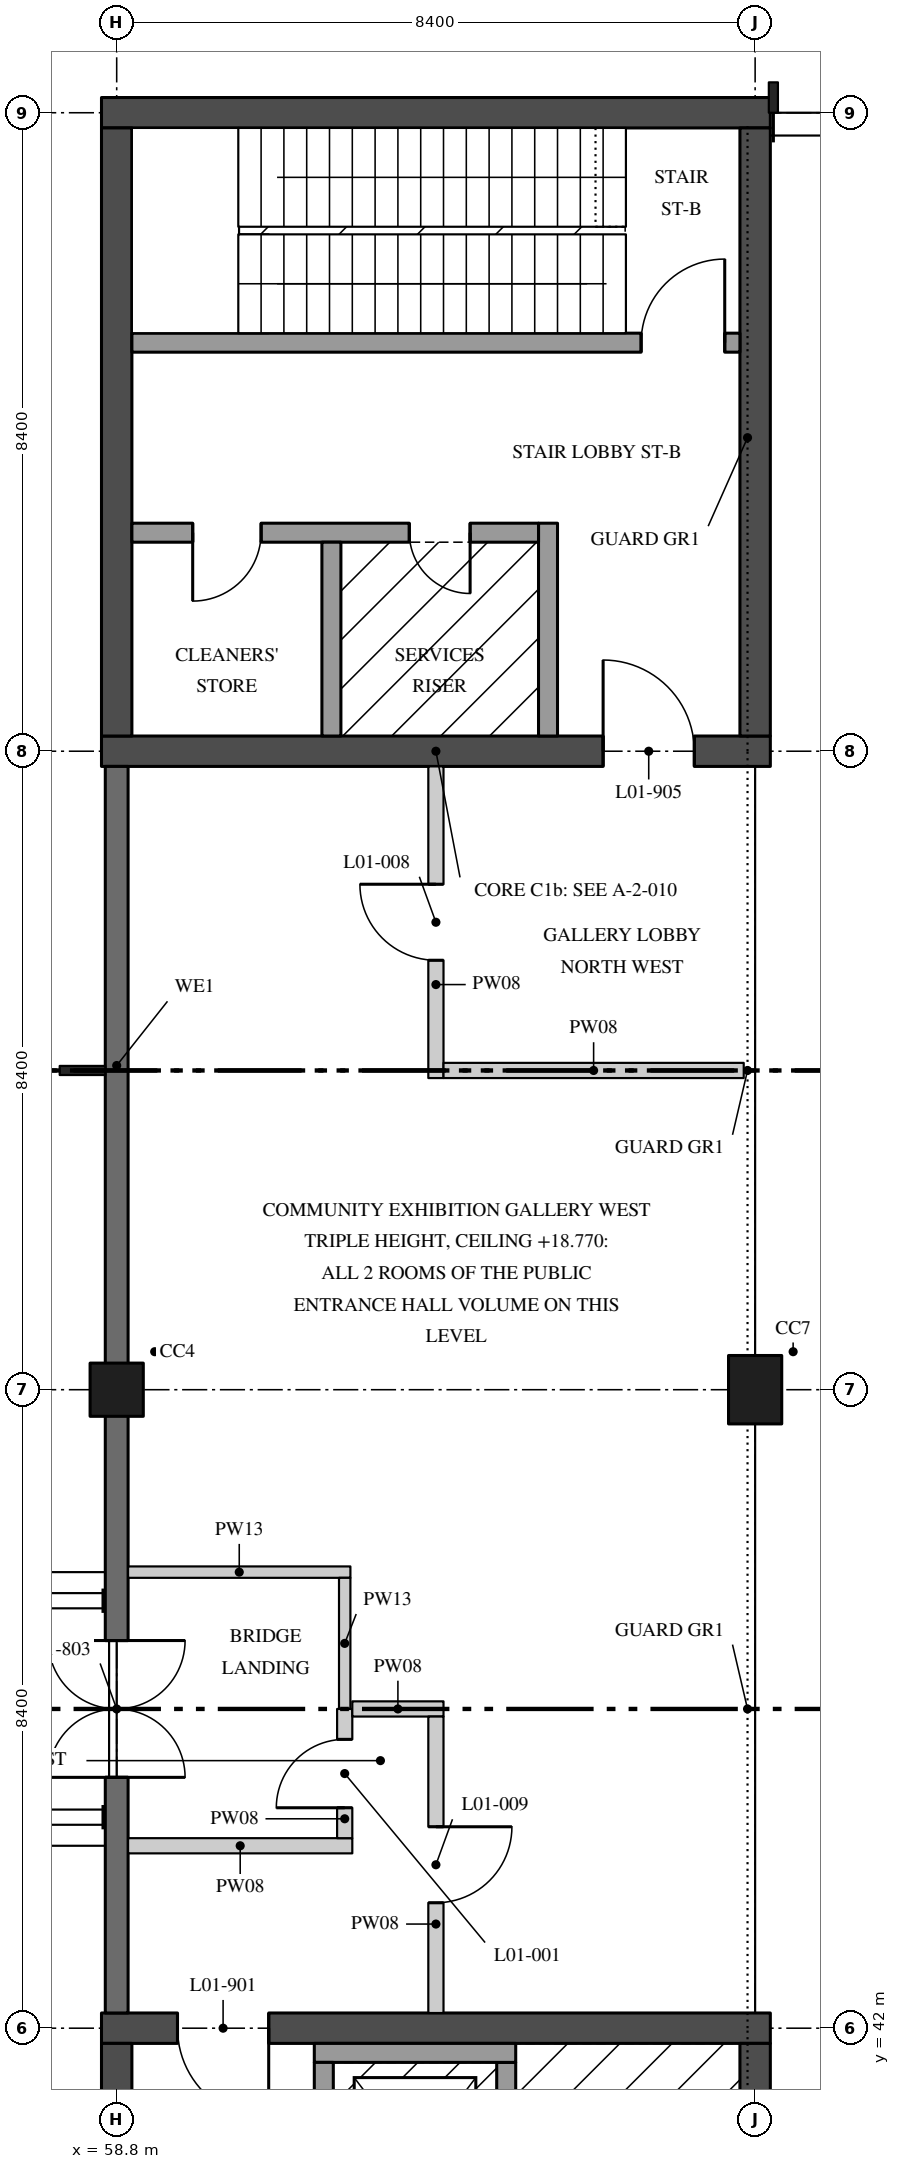
"""IFC4 building model, lengths in metres.
Left out: names, types, materials, properties, quantities, classifications, styles, units other than length and angle.
Written with IfcOpenShell. Run it as: python <this file> out.ifc"""

import sys

from ifc_helpers import new_model, si_unit, direction, frame, frame_2d, origin, origin_2d, place, context, subcontext, project, spatial, rectangle, extrude, element, fill, save


model = new_model("IFC4")
c1 = context("Model", 3, precision=1e-05, world=origin(), true_north=direction((0.0, 1.0)))
c2 = subcontext(c1, "Body", "Model", "MODEL_VIEW")
j1 = project(units=[si_unit("LENGTHUNIT", "METRE"), si_unit("PLANEANGLEUNIT", "RADIAN")], contexts=[c1])
p1 = place(None, origin())
s1 = spatial("IfcSite", under=j1, at=p1, CompositionType="ELEMENT")
p2 = place(p1, origin())
s2 = spatial("IfcBuilding", under=s1, at=p2, CompositionType="ELEMENT")
p3 = place(p2, frame((0.0, 0.0, 5.4)))
s3 = spatial("IfcBuildingStorey", under=s2, at=p3, CompositionType="ELEMENT", Elevation=5.4)
p4 = place(p3, frame((58.8, 50.4, 0.0), z_axis=(0.0, 0.0, 1.0), x_axis=(1.0, 0.0, 0.0)))
e1 = element("IfcColumn", 1, at=p4, inside=s3, PredefinedType="COLUMN", context=c2, shape_type="SweptSolid", body=[
    extrude(rectangle(XDim=0.7, YDim=0.7, at=origin_2d()), origin(), (0.0, 0.0, 1.0), 4.5),
])
p5 = place(p3, frame((67.2, 50.4, 0.0), z_axis=(0.0, 0.0, 1.0), x_axis=(1.0, 0.0, 0.0)))
e2 = element("IfcColumn", 2, at=p5, inside=s3, PredefinedType="COLUMN", context=c2, shape_type="SweptSolid", body=[
    extrude(rectangle(XDim=0.7, YDim=0.9, at=origin_2d()), origin(), (0.0, 0.0, 1.0), 4.5),
])
p6 = place(p3, frame((58.6, 42.0, 0.0), z_axis=(0.0, 0.0, 1.0), x_axis=(1.0, 0.0, 0.0)))
e3 = element("IfcWall", 3, at=p6, inside=s3, PredefinedType="SHEAR", context=c2, shape_type="SweptSolid", body=[
    extrude(rectangle(XDim=8.8, YDim=0.4, at=frame_2d((4.4, 0.0))), origin(), (0.0, 0.0, 1.0), 4.25),
])
p7 = place(p6, frame((1.0, 0.0, 0.0)))
e4 = element("IfcOpeningElement", 4, at=p7, cuts=e3, PredefinedType="OPENING", context=c2, shape_type="SweptSolid", body=[
    extrude(rectangle(XDim=1.2, YDim=2.1, at=frame_2d((0.6, 1.05))), frame((0.0, 0.21, 0.0), z_axis=(0.0, -1.0, 0.0), x_axis=(1.0, 0.0, 0.0)), (0.0, 0.0, 1.0), 0.42),
])
for number, where, z_axis, x_axis in (
    (5, (58.8, 33.8, 0.0), (0.0, 0.0, 1.0), (0.0, 1.0, 0.0)),
    (6, (67.2, 33.8, 0.0), (0.0, 0.0, 1.0), (0.0, 1.0, 0.0)),
):
    element("IfcWall", number, at=place(p3, frame(where, z_axis=z_axis, x_axis=x_axis)), inside=s3, PredefinedType="SHEAR", context=c2, shape_type="SweptSolid", body=[
        extrude(rectangle(XDim=8.0, YDim=0.4, at=frame_2d((4.0, 0.0))), origin(), (0.0, 0.0, 1.0), 4.25),
    ])
p8 = place(p3, frame((58.6, 58.8, 0.0), z_axis=(0.0, 0.0, 1.0), x_axis=(1.0, 0.0, 0.0)))
e7 = element("IfcWall", 7, at=p8, inside=s3, PredefinedType="SHEAR", context=c2, shape_type="SweptSolid", body=[
    extrude(rectangle(XDim=8.8, YDim=0.4, at=frame_2d((4.4, 0.0))), origin(), (0.0, 0.0, 1.0), 4.25),
])
p9 = place(p8, frame((6.6, 0.0, 0.0)))
e8 = element("IfcOpeningElement", 8, at=p9, cuts=e7, PredefinedType="OPENING", context=c2, shape_type="SweptSolid", body=[
    extrude(rectangle(XDim=1.2, YDim=2.1, at=frame_2d((0.6, 1.05))), frame((0.0, 0.21, 0.0), z_axis=(0.0, -1.0, 0.0), x_axis=(1.0, 0.0, 0.0)), (0.0, 0.0, 1.0), 0.42),
])
p10 = place(p3, frame((58.6, 67.2, 0.0), z_axis=(0.0, 0.0, 1.0), x_axis=(1.0, 0.0, 0.0)))
e9 = element("IfcWall", 9, at=p10, inside=s3, PredefinedType="SHEAR", context=c2, shape_type="SweptSolid", body=[
    extrude(rectangle(XDim=8.8, YDim=0.4, at=frame_2d((4.4, 0.0))), origin(), (0.0, 0.0, 1.0), 4.25),
])
for number, where, z_axis, x_axis in (
    (10, (58.8, 59.0, 0.0), (0.0, 0.0, 1.0), (0.0, 1.0, 0.0)),
    (11, (67.2, 59.0, 0.0), (0.0, 0.0, 1.0), (0.0, 1.0, 0.0)),
):
    element("IfcWall", number, at=place(p3, frame(where, z_axis=z_axis, x_axis=x_axis)), inside=s3, PredefinedType="SHEAR", context=c2, shape_type="SweptSolid", body=[
        extrude(rectangle(XDim=8.0, YDim=0.4, at=frame_2d((4.0, 0.0))), origin(), (0.0, 0.0, 1.0), 4.25),
    ])
p11 = place(p3, frame((67.0, 64.175, 0.0), z_axis=(0.0, 0.0, 1.0), x_axis=(-1.0, 0.0, 0.0)))
e12 = element("IfcWall", 12, at=p11, inside=s3, PredefinedType="SOLIDWALL", context=c2, shape_type="SweptSolid", body=[
    extrude(rectangle(XDim=8.0, YDim=0.25, at=frame_2d((4.0, 0.0))), origin(), (0.0, 0.0, 1.0), 4.25),
])
p12 = place(p11, frame((0.2, 0.0, 0.0)))
e13 = element("IfcOpeningElement", 13, at=p12, cuts=e12, PredefinedType="OPENING", context=c2, shape_type="SweptSolid", body=[
    extrude(rectangle(XDim=1.1, YDim=2.1, at=frame_2d((0.55, 1.05))), frame((0.0, 0.135, 0.0), z_axis=(0.0, -1.0, 0.0), x_axis=(1.0, 0.0, 0.0)), (0.0, 0.0, 1.0), 0.27),
])
p13 = place(p3, frame((64.475, 61.8, 0.0), z_axis=(0.0, 0.0, 1.0), x_axis=(0.0, -1.0, 0.0)))
e14 = element("IfcWall", 14, at=p13, inside=s3, PredefinedType="SOLIDWALL", context=c2, shape_type="SweptSolid", body=[
    extrude(rectangle(XDim=2.8, YDim=0.25, at=frame_2d((1.4, 0.0))), origin(), (0.0, 0.0, 1.0), 4.25),
])
p14 = place(p3, frame((64.35, 61.675, 0.0), z_axis=(0.0, 0.0, 1.0), x_axis=(-1.0, 0.0, 0.0)))
e15 = element("IfcWall", 15, at=p14, inside=s3, PredefinedType="SOLIDWALL", context=c2, shape_type="SweptSolid", body=[
    extrude(rectangle(XDim=5.35, YDim=0.25, at=frame_2d((2.675, 0.0))), origin(), (0.0, 0.0, 1.0), 4.25),
])
p15 = place(p14, frame((3.65, 0.0, 0.0)))
e16 = element("IfcOpeningElement", 16, at=p15, cuts=e15, PredefinedType="OPENING", context=c2, shape_type="SweptSolid", body=[
    extrude(rectangle(XDim=0.9, YDim=2.1, at=frame_2d((0.45, 1.05))), frame((0.0, 0.135, 0.0), z_axis=(0.0, -1.0, 0.0), x_axis=(1.0, 0.0, 0.0)), (0.0, 0.0, 1.0), 0.27),
])
p16 = place(p14, frame((0.9, 0.0, 0.0)))
e17 = element("IfcOpeningElement", 17, at=p16, cuts=e15, PredefinedType="OPENING", context=c2, shape_type="SweptSolid", body=[
    extrude(rectangle(XDim=0.8, YDim=2.1, at=frame_2d((0.4, 1.05))), frame((0.0, 0.135, 0.0), z_axis=(0.0, -1.0, 0.0), x_axis=(1.0, 0.0, 0.0)), (0.0, 0.0, 1.0), 0.27),
])
p17 = place(p3, frame((61.625, 61.55, 0.0), z_axis=(0.0, 0.0, 1.0), x_axis=(0.0, -1.0, 0.0)))
e18 = element("IfcWall", 18, at=p17, inside=s3, PredefinedType="SOLIDWALL", context=c2, shape_type="SweptSolid", body=[
    extrude(rectangle(XDim=2.55, YDim=0.25, at=frame_2d((1.275, 0.0))), origin(), (0.0, 0.0, 1.0), 4.25),
])
p18 = place(p3, frame((63.925, 39.25, 0.0), z_axis=(0.0, 0.0, 1.0), x_axis=(0.0, 1.0, 0.0)))
e19 = element("IfcWall", 19, at=p18, inside=s3, PredefinedType="SOLIDWALL", context=c2, shape_type="SweptSolid", body=[
    extrude(rectangle(XDim=2.3, YDim=0.25, at=frame_2d((1.15, 0.0))), origin(), (0.0, 0.0, 1.0), 4.25),
])
p19 = place(p3, frame((61.4, 41.675, 0.0), z_axis=(0.0, 0.0, 1.0), x_axis=(1.0, 0.0, 0.0)))
e20 = element("IfcWall", 20, at=p19, inside=s3, PredefinedType="SOLIDWALL", context=c2, shape_type="SweptSolid", body=[
    extrude(rectangle(XDim=2.65, YDim=0.25, at=frame_2d((1.325, 0.0))), origin(), (0.0, 0.0, 1.0), 4.25),
])
p20 = place(p3, frame((61.525, 39.25, 0.0), z_axis=(0.0, 0.0, 1.0), x_axis=(0.0, 1.0, 0.0)))
e21 = element("IfcWall", 21, at=p20, inside=s3, PredefinedType="SOLIDWALL", context=c2, shape_type="SweptSolid", body=[
    extrude(rectangle(XDim=2.3, YDim=0.25, at=frame_2d((1.15, 0.0))), origin(), (0.0, 0.0, 1.0), 4.25),
])
p21 = place(p2, origin())
s4 = spatial("IfcBuildingStorey", under=s2, at=p21, CompositionType="ELEMENT", Elevation=0.0)
p22 = place(p21, frame((67.2, 46.2, 0.0), z_axis=(0.0, 0.0, 1.0), x_axis=(0.0, 1.0, 0.0)))
e22 = element("IfcWall", 22, at=p22, inside=s4, PredefinedType="PARTITIONING", context=c2, shape_type="SweptSolid", body=[
    extrude(rectangle(XDim=3.75, YDim=0.125, at=frame_2d((1.875, 0.0))), origin(), (0.0, 0.0, 1.0), 18.77),
])
p23 = place(p22, frame((1.35, 0.0, 0.0)))
e23 = element("IfcOpeningElement", 23, at=p23, cuts=e22, PredefinedType="OPENING", context=c2, shape_type="SweptSolid", body=[
    extrude(rectangle(XDim=1.0, YDim=2.4, at=frame_2d((0.5, 1.2))), frame((0.0, 0.073, 0.0), z_axis=(0.0, -1.0, 0.0), x_axis=(1.0, 0.0, 0.0)), (0.0, 0.0, 1.0), 0.145),
])
p24 = place(p21, frame((67.2, 50.85, 0.0), z_axis=(0.0, 0.0, 1.0), x_axis=(0.0, 1.0, 0.0)))
e24 = element("IfcWall", 24, at=p24, inside=s4, PredefinedType="PARTITIONING", context=c2, shape_type="SweptSolid", body=[
    extrude(rectangle(XDim=3.75, YDim=0.125, at=frame_2d((1.875, 0.0))), origin(), (0.0, 0.0, 1.0), 18.77),
])
p25 = place(p24, frame((1.35, 0.0, 0.0)))
e25 = element("IfcOpeningElement", 25, at=p25, cuts=e24, PredefinedType="OPENING", context=c2, shape_type="SweptSolid", body=[
    extrude(rectangle(XDim=1.0, YDim=2.4, at=frame_2d((0.5, 1.2))), frame((0.0, 0.073, 0.0), z_axis=(0.0, -1.0, 0.0), x_axis=(1.0, 0.0, 0.0)), (0.0, 0.0, 1.0), 0.145),
])
p26 = place(p21, frame((67.4, 63.0, 0.0), z_axis=(0.0, 0.0, 1.0), x_axis=(1.0, 0.0, 0.0)))
e26 = element("IfcWall", 26, at=p26, inside=s4, PredefinedType="PARTITIONING", context=c2, shape_type="SweptSolid", body=[
    extrude(rectangle(XDim=4.1, YDim=0.2, at=frame_2d((2.05, 0.0))), origin(), (0.0, 0.0, 1.0), 18.77),
])
p27 = place(p26, frame((1.55, 0.0, 0.0)))
e27 = element("IfcOpeningElement", 27, at=p27, cuts=e26, PredefinedType="OPENING", context=c2, shape_type="SweptSolid", body=[
    extrude(rectangle(XDim=1.0, YDim=2.1, at=frame_2d((0.5, 1.05))), frame((0.0, 0.11, 0.0), z_axis=(0.0, -1.0, 0.0), x_axis=(1.0, 0.0, 0.0)), (0.0, 0.0, 1.0), 0.22),
])
p28 = place(p21, frame((67.2, 54.6, 0.0), z_axis=(0.0, 0.0, 1.0), x_axis=(0.0, 1.0, 0.0)))
e28 = element("IfcWall", 28, at=p28, inside=s4, PredefinedType="PARTITIONING", context=c2, shape_type="SweptSolid", body=[
    extrude(rectangle(XDim=4.0, YDim=0.2, at=frame_2d((2.0, 0.0))), origin(), (0.0, 0.0, 1.0), 18.77),
])
p29 = place(p28, frame((1.5, 0.0, 0.0)))
e29 = element("IfcOpeningElement", 29, at=p29, cuts=e28, PredefinedType="OPENING", context=c2, shape_type="SweptSolid", body=[
    extrude(rectangle(XDim=1.0, YDim=2.4, at=frame_2d((0.5, 1.2))), frame((0.0, 0.11, 0.0), z_axis=(0.0, -1.0, 0.0), x_axis=(1.0, 0.0, 0.0)), (0.0, 0.0, 1.0), 0.22),
])
p30 = place(p21, frame((67.2, 42.2, 0.0), z_axis=(0.0, 0.0, 1.0), x_axis=(0.0, 1.0, 0.0)))
e30 = element("IfcWall", 30, at=p30, inside=s4, PredefinedType="PARTITIONING", context=c2, shape_type="SweptSolid", body=[
    extrude(rectangle(XDim=4.0, YDim=0.2, at=frame_2d((2.0, 0.0))), origin(), (0.0, 0.0, 1.0), 18.77),
])
p31 = place(p30, frame((1.5, 0.0, 0.0)))
e31 = element("IfcOpeningElement", 31, at=p31, cuts=e30, PredefinedType="OPENING", context=c2, shape_type="SweptSolid", body=[
    extrude(rectangle(XDim=1.0, YDim=2.4, at=frame_2d((0.5, 1.2))), frame((0.0, 0.11, 0.0), z_axis=(0.0, -1.0, 0.0), x_axis=(1.0, 0.0, 0.0)), (0.0, 0.0, 1.0), 0.22),
])
p32 = place(p3, frame((58.95, 44.4, 0.0), z_axis=(0.0, 0.0, 1.0), x_axis=(1.0, 0.0, 0.0)))
e32 = element("IfcWall", 32, at=p32, inside=s3, PredefinedType="PARTITIONING", context=c2, shape_type="SweptSolid", body=[
    extrude(rectangle(XDim=2.95, YDim=0.2, at=frame_2d((1.475, 0.0))), origin(), (0.0, 0.0, 1.0), 4.25),
])
p33 = place(p3, frame((61.8, 44.5, 0.0), z_axis=(0.0, 0.0, 1.0), x_axis=(0.0, 1.0, 0.0)))
e33 = element("IfcWall", 33, at=p33, inside=s3, PredefinedType="PARTITIONING", context=c2, shape_type="SweptSolid", body=[
    extrude(rectangle(XDim=1.7, YDim=0.2, at=frame_2d((0.85, 0.0))), origin(), (0.0, 0.0, 1.0), 4.25),
])
p34 = place(p33, frame((0.4, 0.0, 0.0)))
e34 = element("IfcOpeningElement", 34, at=p34, cuts=e33, PredefinedType="OPENING", context=c2, shape_type="SweptSolid", body=[
    extrude(rectangle(XDim=0.9, YDim=2.1, at=frame_2d((0.45, 1.05))), frame((0.0, 0.11, 0.0), z_axis=(0.0, -1.0, 0.0), x_axis=(1.0, 0.0, 0.0)), (0.0, 0.0, 1.0), 0.22),
])
p35 = place(p3, frame((58.95, 48.0, 0.0), z_axis=(0.0, 0.0, 1.0), x_axis=(1.0, 0.0, 0.0)))
e35 = element("IfcWall", 35, at=p35, inside=s3, PredefinedType="PARTITIONING", context=c2, shape_type="SweptSolid", body=[
    extrude(rectangle(XDim=2.925, YDim=0.15, at=frame_2d((1.462, 0.0))), origin(), (0.0, 0.0, 1.0), 4.25),
])
p36 = place(p3, frame((61.8, 46.2, 0.0), z_axis=(0.0, 0.0, 1.0), x_axis=(0.0, 1.0, 0.0)))
e36 = element("IfcWall", 36, at=p36, inside=s3, PredefinedType="PARTITIONING", context=c2, shape_type="SweptSolid", body=[
    extrude(rectangle(XDim=1.725, YDim=0.15, at=frame_2d((0.863, 0.0))), origin(), (0.0, 0.0, 1.0), 4.25),
])
p37 = place(p3, frame((63.0, 54.5, 0.0), z_axis=(0.0, 0.0, 1.0), x_axis=(0.0, 1.0, 0.0)))
e37 = element("IfcWall", 37, at=p37, inside=s3, PredefinedType="PARTITIONING", context=c2, shape_type="SweptSolid", body=[
    extrude(rectangle(XDim=4.1, YDim=0.2, at=frame_2d((2.05, 0.0))), origin(), (0.0, 0.0, 1.0), 4.25),
])
p38 = place(p37, frame((1.55, 0.0, 0.0)))
e38 = element("IfcOpeningElement", 38, at=p38, cuts=e37, PredefinedType="OPENING", context=c2, shape_type="SweptSolid", body=[
    extrude(rectangle(XDim=1.0, YDim=2.4, at=frame_2d((0.5, 1.2))), frame((0.0, 0.11, 0.0), z_axis=(0.0, -1.0, 0.0), x_axis=(1.0, 0.0, 0.0)), (0.0, 0.0, 1.0), 0.22),
])
p39 = place(p3, frame((63.1, 54.6, 0.0), z_axis=(0.0, 0.0, 1.0), x_axis=(1.0, 0.0, 0.0)))
e39 = element("IfcWall", 39, at=p39, inside=s3, PredefinedType="PARTITIONING", context=c2, shape_type="SweptSolid", body=[
    extrude(rectangle(XDim=3.95, YDim=0.2, at=frame_2d((1.975, 0.0))), origin(), (0.0, 0.0, 1.0), 4.25),
])
p40 = place(p3, frame((61.9, 46.2, 0.0), z_axis=(0.0, 0.0, 1.0), x_axis=(1.0, 0.0, 0.0)))
e40 = element("IfcWall", 40, at=p40, inside=s3, PredefinedType="PARTITIONING", context=c2, shape_type="SweptSolid", body=[
    extrude(rectangle(XDim=1.2, YDim=0.2, at=frame_2d((0.6, 0.0))), origin(), (0.0, 0.0, 1.0), 4.25),
])
p41 = place(p3, frame((63.0, 42.2, 0.0), z_axis=(0.0, 0.0, 1.0), x_axis=(0.0, 1.0, 0.0)))
e41 = element("IfcWall", 41, at=p41, inside=s3, PredefinedType="PARTITIONING", context=c2, shape_type="SweptSolid", body=[
    extrude(rectangle(XDim=3.9, YDim=0.2, at=frame_2d((1.95, 0.0))), origin(), (0.0, 0.0, 1.0), 4.25),
])
p42 = place(p41, frame((1.45, 0.0, 0.0)))
e42 = element("IfcOpeningElement", 42, at=p42, cuts=e41, PredefinedType="OPENING", context=c2, shape_type="SweptSolid", body=[
    extrude(rectangle(XDim=1.0, YDim=2.4, at=frame_2d((0.5, 1.2))), frame((0.0, 0.11, 0.0), z_axis=(0.0, -1.0, 0.0), x_axis=(1.0, 0.0, 0.0)), (0.0, 0.0, 1.0), 0.22),
])
p43 = place(p3, frame((58.8, 58.6, 0.0), z_axis=(0.0, 0.0, 1.0), x_axis=(0.0, -1.0, 0.0)))
e43 = element("IfcWall", 43, at=p43, inside=s3, PredefinedType="SOLIDWALL", context=c2, shape_type="SweptSolid", body=[
    extrude(rectangle(XDim=7.87, YDim=0.3, at=frame_2d((3.935, 0.0))), origin(), (0.0, 0.0, 1.0), 4.5),
])
p44 = place(p3, frame((58.8, 50.07, 0.0), z_axis=(0.0, 0.0, 1.0), x_axis=(0.0, -1.0, 0.0)))
e44 = element("IfcWall", 44, at=p44, inside=s3, PredefinedType="SOLIDWALL", context=c2, shape_type="SweptSolid", body=[
    extrude(rectangle(XDim=7.87, YDim=0.3, at=frame_2d((3.935, 0.0))), origin(), (0.0, 0.0, 1.0), 4.5),
])
p45 = place(p44, frame((2.97, 0.0, 0.0)))
e45 = element("IfcOpeningElement", 45, at=p45, cuts=e44, PredefinedType="OPENING", context=c2, shape_type="SweptSolid", body=[
    extrude(rectangle(XDim=1.8, YDim=2.4, at=frame_2d((0.9, 1.2))), frame((0.0, 0.16, 0.0), z_axis=(0.0, -1.0, 0.0), x_axis=(1.0, 0.0, 0.0)), (0.0, 0.0, 1.0), 0.32),
])
p46 = place(p7, frame((1.2, 0.0, 0.0), z_axis=(0.0, 0.0, 1.0), x_axis=(-1.0, 0.0, 0.0)))
e46 = element("IfcDoor", 46, at=p46, inside=s3, OperationType="SINGLE_SWING_RIGHT", PredefinedType="DOOR", context=c2, shape_type="SweptSolid", body=[
    extrude(rectangle(XDim=1.2, YDim=2.1, at=frame_2d((0.6, 1.05))), frame((0.0, 0.035, 0.0), z_axis=(0.0, -1.0, 0.0), x_axis=(1.0, 0.0, 0.0)), (0.0, 0.0, 1.0), 0.07),
])
fill(e4, e46)
p47 = place(p15, origin())
e47 = element("IfcDoor", 47, at=p47, inside=s3, OperationType="SINGLE_SWING_LEFT", PredefinedType="DOOR", context=c2, shape_type="SweptSolid", body=[
    extrude(rectangle(XDim=0.9, YDim=2.1, at=frame_2d((0.45, 1.05))), frame((0.0, 0.035, 0.0), z_axis=(0.0, -1.0, 0.0), x_axis=(1.0, 0.0, 0.0)), (0.0, 0.0, 1.0), 0.07),
])
fill(e16, e47)
p48 = place(p9, origin())
e48 = element("IfcDoor", 48, at=p48, inside=s3, OperationType="SINGLE_SWING_RIGHT", PredefinedType="DOOR", context=c2, shape_type="SweptSolid", body=[
    extrude(rectangle(XDim=1.2, YDim=2.1, at=frame_2d((0.6, 1.05))), frame((0.0, 0.035, 0.0), z_axis=(0.0, -1.0, 0.0), x_axis=(1.0, 0.0, 0.0)), (0.0, 0.0, 1.0), 0.07),
])
fill(e8, e48)
p49 = place(p16, origin())
e49 = element("IfcDoor", 49, at=p49, inside=s3, OperationType="SINGLE_SWING_RIGHT", PredefinedType="DOOR", context=c2, shape_type="SweptSolid", body=[
    extrude(rectangle(XDim=0.8, YDim=2.1, at=frame_2d((0.4, 1.05))), frame((0.0, 0.035, 0.0), z_axis=(0.0, -1.0, 0.0), x_axis=(1.0, 0.0, 0.0)), (0.0, 0.0, 1.0), 0.07),
])
fill(e17, e49)
p50 = place(p12, frame((1.1, 0.0, 0.0), z_axis=(0.0, 0.0, 1.0), x_axis=(-1.0, 0.0, 0.0)))
e50 = element("IfcDoor", 50, at=p50, inside=s3, OperationType="SINGLE_SWING_LEFT", PredefinedType="DOOR", context=c2, shape_type="SweptSolid", body=[
    extrude(rectangle(XDim=1.1, YDim=2.1, at=frame_2d((0.55, 1.05))), frame((0.0, 0.035, 0.0), z_axis=(0.0, -1.0, 0.0), x_axis=(1.0, 0.0, 0.0)), (0.0, 0.0, 1.0), 0.07),
])
fill(e13, e50)
p51 = place(p34, origin())
e51 = element("IfcDoor", 51, at=p51, inside=s3, OperationType="SINGLE_SWING_RIGHT", PredefinedType="DOOR", context=c2, shape_type="SweptSolid", body=[
    extrude(rectangle(XDim=0.9, YDim=2.1, at=frame_2d((0.45, 1.05))), frame((0.0, 0.03, 0.0), z_axis=(0.0, -1.0, 0.0), x_axis=(1.0, 0.0, 0.0)), (0.0, 0.0, 1.0), 0.06),
])
fill(e34, e51)
p52 = place(p38, origin())
e52 = element("IfcDoor", 52, at=p52, inside=s3, OperationType="SINGLE_SWING_LEFT", PredefinedType="DOOR", context=c2, shape_type="SweptSolid", body=[
    extrude(rectangle(XDim=1.0, YDim=2.4, at=frame_2d((0.5, 1.2))), frame((0.0, 0.035, 0.0), z_axis=(0.0, -1.0, 0.0), x_axis=(1.0, 0.0, 0.0)), (0.0, 0.0, 1.0), 0.07),
])
fill(e38, e52)
p53 = place(p42, frame((1.0, 0.0, 0.0), z_axis=(0.0, 0.0, 1.0), x_axis=(-1.0, 0.0, 0.0)))
e53 = element("IfcDoor", 53, at=p53, inside=s3, OperationType="SINGLE_SWING_RIGHT", PredefinedType="DOOR", context=c2, shape_type="SweptSolid", body=[
    extrude(rectangle(XDim=1.0, YDim=2.4, at=frame_2d((0.5, 1.2))), frame((0.0, 0.035, 0.0), z_axis=(0.0, -1.0, 0.0), x_axis=(1.0, 0.0, 0.0)), (0.0, 0.0, 1.0), 0.07),
])
fill(e42, e53)
p54 = place(p45, frame((1.8, 0.0, 0.0), z_axis=(0.0, 0.0, 1.0), x_axis=(-1.0, 0.0, 0.0)))
e54 = element("IfcDoor", 54, at=p54, inside=s3, OperationType="DOUBLE_DOOR_DOUBLE_SWING", PredefinedType="DOOR", context=c2, shape_type="SweptSolid", body=[
    extrude(rectangle(XDim=1.8, YDim=2.4, at=frame_2d((0.9, 1.2))), frame((0.0, 0.025, 0.0), z_axis=(0.0, -1.0, 0.0), x_axis=(1.0, 0.0, 0.0)), (0.0, 0.0, 1.0), 0.05),
])
fill(e45, e54)
save(model, sys.argv[1])
